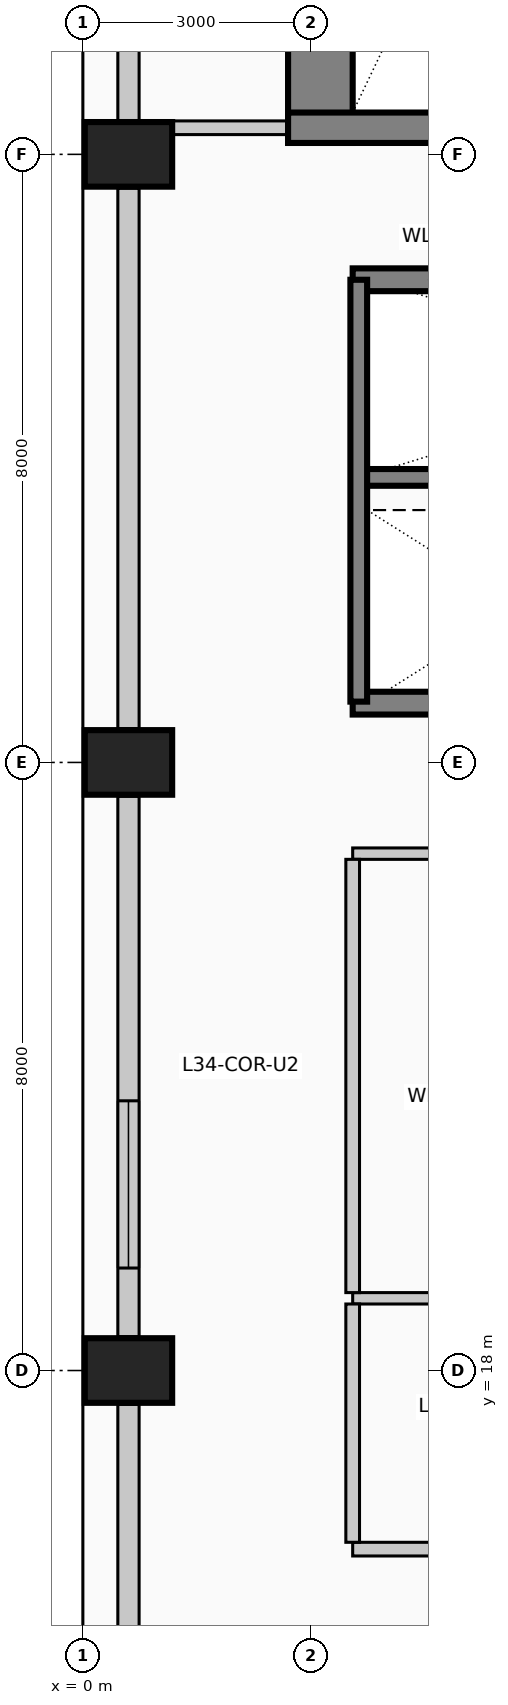
"""IFC4 building model, lengths in metres.
Left out: names, types, materials, properties, quantities, classifications, styles, units other than length and angle.
Written with IfcOpenShell. Run it as: python <this file> out.ifc"""

import sys

from ifc_helpers import new_model, si_unit, direction, frame, frame_2d, origin, origin_2d, place, context, subcontext, project, spatial, rectangle, extrude, element, fill, save


model = new_model("IFC4")
c1 = context("Model", 3, precision=1e-05, world=origin(), true_north=direction((0.0, 1.0)))
c2 = subcontext(c1, "Body", "Model", "MODEL_VIEW")
j1 = project(units=[si_unit("LENGTHUNIT", "METRE"), si_unit("PLANEANGLEUNIT", "RADIAN")], contexts=[c1])
p1 = place(None, origin())
s1 = spatial("IfcSite", under=j1, at=p1, CompositionType="ELEMENT")
p2 = place(p1, origin())
s2 = spatial("IfcBuilding", under=s1, at=p2, CompositionType="ELEMENT")
p3 = place(p2, frame((0.0, 0.0, 140.6)))
s3 = spatial("IfcBuildingStorey", under=s2, at=p3, CompositionType="ELEMENT", Elevation=140.6)
p4 = place(p3, frame((3.125, 34.15, 0.0), z_axis=(0.0, 0.0, 1.0), x_axis=(0.0, 1.0, 0.0)))
e1 = element("IfcWall", 1, at=p4, inside=s3, PredefinedType="SHEAR", context=c2, shape_type="SweptSolid", body=[
    extrude(rectangle(XDim=9.13, YDim=0.85, at=frame_2d((4.565, 0.0))), origin(), (0.0, 0.0, 1.0), 4.0),
])
p5 = place(p3, frame((2.7, 34.35, 0.0), z_axis=(0.0, 0.0, 1.0), x_axis=(1.0, 0.0, 0.0)))
e2 = element("IfcWall", 2, at=p5, inside=s3, PredefinedType="SHEAR", context=c2, shape_type="SweptSolid", body=[
    extrude(rectangle(XDim=5.01, YDim=0.4, at=frame_2d((2.505, 0.0))), origin(), (0.0, 0.0, 1.0), 4.0),
])
p6 = place(p5, frame((2.4, 0.0, 0.0)))
e3 = element("IfcOpeningElement", 3, at=p6, cuts=e2, PredefinedType="OPENING", context=c2, shape_type="SweptSolid", body=[
    extrude(rectangle(XDim=1.15, YDim=2.2, at=frame_2d((0.575, 1.1))), frame((0.0, 0.21, 0.0), z_axis=(0.0, -1.0, 0.0), x_axis=(1.0, 0.0, 0.0)), (0.0, 0.0, 1.0), 0.42),
])
for number, where, z_axis, x_axis in (
    (4, (0.6, 18.0, 0.0), (0.0, 0.0, 1.0), (0.0, 1.0, 0.0)),
    (5, (0.6, 26.0, 0.0), (0.0, 0.0, 1.0), (0.0, 1.0, 0.0)),
    (6, (0.6, 34.0, 0.0), (0.0, 0.0, 1.0), (0.0, 1.0, 0.0)),
):
    element("IfcColumn", number, at=place(p3, frame(where, z_axis=z_axis, x_axis=x_axis)), inside=s3, PredefinedType="COLUMN", context=c2, shape_type="SweptSolid", body=[
        extrude(rectangle(XDim=0.85, YDim=1.15, at=origin_2d()), origin(), (0.0, 0.0, 1.0), 4.0),
    ])
p7 = place(p3, frame((0.6, 10.445, 0.0), z_axis=(0.0, 0.0, 1.0), x_axis=(0.0, 1.0, 0.0)))
e7 = element("IfcWall", 7, at=p7, inside=s3, PredefinedType="SOLIDWALL", context=c2, shape_type="SweptSolid", body=[
    extrude(rectangle(XDim=7.11, YDim=0.28, at=frame_2d((3.555, 0.0))), origin(), (0.0, 0.0, 1.0), 2.875),
])
p8 = place(p3, frame((0.6, 18.445, 0.0), z_axis=(0.0, 0.0, 1.0), x_axis=(0.0, 1.0, 0.0)))
e8 = element("IfcWall", 8, at=p8, inside=s3, PredefinedType="SOLIDWALL", context=c2, shape_type="SweptSolid", body=[
    extrude(rectangle(XDim=7.11, YDim=0.28, at=frame_2d((3.555, 0.0))), origin(), (0.0, 0.0, 1.0), 2.875),
])
p9 = place(p8, frame((0.903, 0.0, 0.5)))
e9 = element("IfcOpeningElement", 9, at=p9, cuts=e8, PredefinedType="OPENING", context=c2, shape_type="SweptSolid", body=[
    extrude(rectangle(XDim=2.2, YDim=1.95, at=frame_2d((1.1, 0.975))), frame((0.0, 0.15, 0.0), z_axis=(0.0, -1.0, 0.0), x_axis=(1.0, 0.0, 0.0)), (0.0, 0.0, 1.0), 0.3),
])
p10 = place(p3, frame((0.6, 26.445, 0.0), z_axis=(0.0, 0.0, 1.0), x_axis=(0.0, 1.0, 0.0)))
e10 = element("IfcWall", 10, at=p10, inside=s3, PredefinedType="SOLIDWALL", context=c2, shape_type="SweptSolid", body=[
    extrude(rectangle(XDim=7.11, YDim=0.28, at=frame_2d((3.555, 0.0))), origin(), (0.0, 0.0, 1.0), 2.875),
])
p11 = place(p3, frame((0.6, 34.445, 0.0), z_axis=(0.0, 0.0, 1.0), x_axis=(0.0, 1.0, 0.0)))
e11 = element("IfcWall", 11, at=p11, inside=s3, PredefinedType="SOLIDWALL", context=c2, shape_type="SweptSolid", body=[
    extrude(rectangle(XDim=7.51, YDim=0.28, at=frame_2d((3.755, 0.0))), origin(), (0.0, 0.0, 1.0), 2.875),
])
for number, where, z_axis, x_axis in (
    (12, (3.55, 32.35, 0.0), (0.0, 0.0, 1.0), (1.0, 0.0, 0.0)),
    (13, (5.65, 26.78, 0.0), (0.0, 0.0, 1.0), (-1.0, 0.0, 0.0)),
):
    element("IfcWall", number, at=place(p3, frame(where, z_axis=z_axis, x_axis=x_axis)), inside=s3, PredefinedType="SOLIDWALL", context=c2, shape_type="SweptSolid", body=[
        extrude(rectangle(XDim=2.1, YDim=0.3, at=frame_2d((1.05, 0.0))), origin(), (0.0, 0.0, 1.0), 4.0),
    ])
p12 = place(p3, frame((3.55, 29.75, 0.0), z_axis=(0.0, 0.0, 1.0), x_axis=(1.0, 0.0, 0.0)))
e14 = element("IfcWall", 14, at=p12, inside=s3, PredefinedType="SOLIDWALL", context=c2, shape_type="SweptSolid", body=[
    extrude(rectangle(XDim=8.65, YDim=0.22, at=frame_2d((4.325, 0.0))), origin(), (0.0, 0.0, 1.0), 4.0),
])
p13 = place(p3, frame((3.63, 26.8, 0.0), z_axis=(0.0, 0.0, 1.0), x_axis=(0.0, 1.0, 0.0)))
e15 = element("IfcWall", 15, at=p13, inside=s3, PredefinedType="SOLIDWALL", context=c2, shape_type="SweptSolid", body=[
    extrude(rectangle(XDim=5.55, YDim=0.22, at=frame_2d((2.775, 0.0))), origin(), (0.0, 0.0, 1.0), 4.0),
])
p14 = place(p3, frame((3.55, 15.65, 0.0), z_axis=(0.0, 0.0, 1.0), x_axis=(1.0, 0.0, 0.0)))
e16 = element("IfcWall", 16, at=p14, inside=s3, PredefinedType="PARTITIONING", context=c2, shape_type="SweptSolid", body=[
    extrude(rectangle(XDim=4.45, YDim=0.18, at=frame_2d((2.225, 0.0))), origin(), (0.0, 0.0, 1.0), 3.725),
])
p15 = place(p14, frame((1.75, 0.0, 0.0)))
e17 = element("IfcOpeningElement", 17, at=p15, cuts=e16, PredefinedType="OPENING", context=c2, shape_type="SweptSolid", body=[
    extrude(rectangle(XDim=0.95, YDim=2.15, at=frame_2d((0.475, 1.075))), frame((0.0, 0.1, 0.0), z_axis=(0.0, -1.0, 0.0), x_axis=(1.0, 0.0, 0.0)), (0.0, 0.0, 1.0), 0.2),
])
p16 = place(p3, frame((3.55, 18.95, 0.0), z_axis=(0.0, 0.0, 1.0), x_axis=(1.0, 0.0, 0.0)))
e18 = element("IfcWall", 18, at=p16, inside=s3, PredefinedType="PARTITIONING", context=c2, shape_type="SweptSolid", body=[
    extrude(rectangle(XDim=4.45, YDim=0.15, at=frame_2d((2.225, 0.0))), origin(), (0.0, 0.0, 1.0), 3.725),
])
p17 = place(p3, frame((3.55, 24.8, 0.0), z_axis=(0.0, 0.0, 1.0), x_axis=(1.0, 0.0, 0.0)))
e19 = element("IfcWall", 19, at=p17, inside=s3, PredefinedType="PARTITIONING", context=c2, shape_type="SweptSolid", body=[
    extrude(rectangle(XDim=6.25, YDim=0.15, at=frame_2d((3.125, 0.0))), origin(), (0.0, 0.0, 1.0), 3.725),
])
p18 = place(p17, frame((2.6, 0.0, 0.0)))
e20 = element("IfcOpeningElement", 20, at=p18, cuts=e19, PredefinedType="OPENING", context=c2, shape_type="SweptSolid", body=[
    extrude(rectangle(XDim=1.05, YDim=2.15, at=frame_2d((0.525, 1.075))), frame((0.0, 0.085, 0.0), z_axis=(0.0, -1.0, 0.0), x_axis=(1.0, 0.0, 0.0)), (0.0, 0.0, 1.0), 0.17),
])
p19 = place(p3, frame((1.175, 34.35, 0.0), z_axis=(0.0, 0.0, 1.0), x_axis=(1.0, 0.0, 0.0)))
e21 = element("IfcWall", 21, at=p19, inside=s3, PredefinedType="PARTITIONING", context=c2, shape_type="SweptSolid", body=[
    extrude(rectangle(XDim=1.525, YDim=0.18, at=frame_2d((0.762, 0.0))), origin(), (0.0, 0.0, 1.0), 3.725),
])
p20 = place(p3, frame((3.55, 15.74, 0.0), z_axis=(0.0, 0.0, 1.0), x_axis=(0.0, 1.0, 0.0)))
e22 = element("IfcWall", 22, at=p20, inside=s3, PredefinedType="PARTITIONING", context=c2, shape_type="SweptSolid", body=[
    extrude(rectangle(XDim=3.135, YDim=0.18, at=frame_2d((1.567, 0.0))), origin(), (0.0, 0.0, 1.0), 3.725),
])
p21 = place(p3, frame((3.55, 19.025, 0.0), z_axis=(0.0, 0.0, 1.0), x_axis=(0.0, 1.0, 0.0)))
e23 = element("IfcWall", 23, at=p21, inside=s3, PredefinedType="PARTITIONING", context=c2, shape_type="SweptSolid", body=[
    extrude(rectangle(XDim=5.7, YDim=0.18, at=frame_2d((2.85, 0.0))), origin(), (0.0, 0.0, 1.0), 3.725),
])
p22 = place(p9, origin())
e24 = element("IfcWindow", 24, at=p22, inside=s3, PartitioningType="SINGLE_PANEL", PredefinedType="WINDOW", context=c2, shape_type="SweptSolid", body=[
    extrude(rectangle(XDim=2.2, YDim=1.95, at=frame_2d((1.1, 0.975))), frame((0.0, 0.03, 0.0), z_axis=(0.0, -1.0, 0.0), x_axis=(1.0, 0.0, 0.0)), (0.0, 0.0, 1.0), 0.06),
])
fill(e9, e24)
save(model, sys.argv[1])
